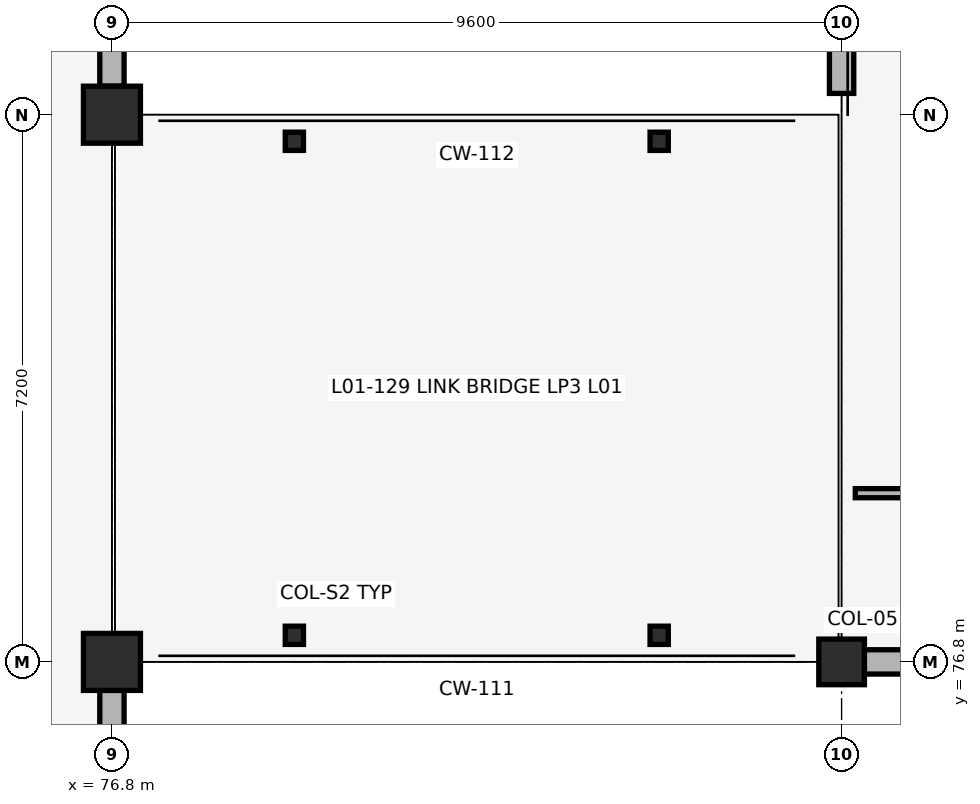
"""IFC4 building model, lengths in metres.
Left out: names, types, materials, properties, quantities, classifications, styles, units other than length and angle.
Written with IfcOpenShell. Run it as: python <this file> out.ifc"""

import sys

from ifc_helpers import new_model, si_unit, direction, frame, frame_2d, origin, origin_2d, place, context, subcontext, project, spatial, rectangle, i_section, extrude, element, save


model = new_model("IFC4")
c1 = context("Model", 3, precision=1e-05, world=origin(), true_north=direction((0.0, 1.0)))
c2 = subcontext(c1, "Body", "Model", "MODEL_VIEW")
j1 = project(units=[si_unit("LENGTHUNIT", "METRE"), si_unit("PLANEANGLEUNIT", "RADIAN")], contexts=[c1])
p1 = place(None, origin())
s1 = spatial("IfcSite", under=j1, at=p1, CompositionType="ELEMENT")
p2 = place(p1, origin())
s2 = spatial("IfcBuilding", under=s1, at=p2, CompositionType="ELEMENT")
p3 = place(p2, frame((0.0, 0.0, 4.42)))
s3 = spatial("IfcBuildingStorey", under=s2, at=p3, CompositionType="ELEMENT", Elevation=4.42)
for number, where, z_axis, x_axis in (
    (1, (76.8, 76.8, 0.0), (0.0, 0.0, 1.0), (1.0, 0.0, 0.0)),
    (2, (76.8, 84.0, 0.0), (0.0, 0.0, 1.0), (1.0, 0.0, 0.0)),
):
    element("IfcColumn", number, at=place(p3, frame(where, z_axis=z_axis, x_axis=x_axis)), inside=s3, PredefinedType="COLUMN", context=c2, shape_type="SweptSolid", body=[
        extrude(rectangle(XDim=0.75, YDim=0.75, at=origin_2d()), origin(), (0.0, 0.0, 1.0), 4.08),
    ])
for number, where, z_axis, x_axis in (
    (3, (79.2, 77.15, 0.0), (0.0, 0.0, 1.0), (1.0, 0.0, 0.0)),
    (4, (79.2, 83.65, 0.0), (0.0, 0.0, 1.0), (1.0, 0.0, 0.0)),
    (5, (84.0, 77.15, 0.0), (0.0, 0.0, 1.0), (1.0, 0.0, 0.0)),
    (6, (84.0, 83.65, 0.0), (0.0, 0.0, 1.0), (1.0, 0.0, 0.0)),
):
    element("IfcColumn", number, at=place(p3, frame(where, z_axis=z_axis, x_axis=x_axis)), inside=s3, PredefinedType="COLUMN", context=c2, shape_type="SweptSolid", body=[
        extrude(i_section(OverallWidth=0.24, OverallDepth=0.24, WebThickness=0.01, FlangeThickness=0.017, FilletRadius=0.021, at=origin_2d()), origin(), (0.0, 0.0, 1.0), 4.08),
    ])
p4 = place(p3, frame((86.4, 76.8, 0.0), z_axis=(0.0, 0.0, 1.0), x_axis=(1.0, 0.0, 0.0)))
e7 = element("IfcColumn", 7, at=p4, inside=s3, PredefinedType="COLUMN", context=c2, shape_type="SweptSolid", body=[
    extrude(rectangle(XDim=0.6, YDim=0.6, at=origin_2d()), origin(), (0.0, 0.0, 1.0), 4.28),
])
p5 = place(p3, frame((86.7, 76.8, 0.0), z_axis=(0.0, 0.0, 1.0), x_axis=(1.0, 0.0, 0.0)))
e8 = element("IfcWall", 8, at=p5, inside=s3, PredefinedType="SOLIDWALL", context=c2, shape_type="SweptSolid", body=[
    extrude(rectangle(XDim=9.0, YDim=0.32, at=frame_2d((4.5, 0.0))), origin(), (0.0, 0.0, 1.0), 3.63),
])
p6 = place(p5, frame((2.325, 0.0, 0.72)))
e9 = element("IfcOpeningElement", 9, at=p6, cuts=e8, PredefinedType="OPENING", context=c2, shape_type="SweptSolid", body=[
    extrude(rectangle(XDim=1.35, YDim=2.42, at=frame_2d((0.675, 1.21))), frame((0.0, 0.17, 0.0), z_axis=(0.0, -1.0, 0.0), x_axis=(1.0, 0.0, 0.0)), (0.0, 0.0, 1.0), 0.34),
])
p7 = place(p5, frame((5.325, 0.0, 0.72)))
e10 = element("IfcOpeningElement", 10, at=p7, cuts=e8, PredefinedType="OPENING", context=c2, shape_type="SweptSolid", body=[
    extrude(rectangle(XDim=1.35, YDim=2.42, at=frame_2d((0.675, 1.21))), frame((0.0, 0.17, 0.0), z_axis=(0.0, -1.0, 0.0), x_axis=(1.0, 0.0, 0.0)), (0.0, 0.0, 1.0), 0.34),
])
p8 = place(p3, frame((86.4, 90.92, 0.0), z_axis=(0.0, 0.0, 1.0), x_axis=(0.0, -1.0, 0.0)))
e11 = element("IfcWall", 11, at=p8, inside=s3, PredefinedType="SOLIDWALL", context=c2, shape_type="SweptSolid", body=[
    extrude(rectangle(XDim=6.64, YDim=0.32, at=frame_2d((3.32, 0.0))), origin(), (0.0, 0.0, 1.0), 3.63),
])
p9 = place(p8, frame((1.538, 0.0, 0.72)))
e12 = element("IfcOpeningElement", 12, at=p9, cuts=e11, PredefinedType="OPENING", context=c2, shape_type="SweptSolid", body=[
    extrude(rectangle(XDim=1.35, YDim=2.42, at=frame_2d((0.675, 1.21))), frame((0.0, 0.17, 0.0), z_axis=(0.0, -1.0, 0.0), x_axis=(1.0, 0.0, 0.0)), (0.0, 0.0, 1.0), 0.34),
])
p10 = place(p8, frame((3.752, 0.0, 0.72)))
e13 = element("IfcOpeningElement", 13, at=p10, cuts=e11, PredefinedType="OPENING", context=c2, shape_type="SweptSolid", body=[
    extrude(rectangle(XDim=1.35, YDim=2.42, at=frame_2d((0.675, 1.21))), frame((0.0, 0.17, 0.0), z_axis=(0.0, -1.0, 0.0), x_axis=(1.0, 0.0, 0.0)), (0.0, 0.0, 1.0), 0.34),
])
for number, where, z_axis, x_axis in (
    (14, (76.8, 69.975, 0.0), (0.0, 0.0, 1.0), (0.0, 1.0, 0.0)),
    (15, (76.8, 84.375, 0.0), (0.0, 0.0, 1.0), (0.0, 1.0, 0.0)),
):
    element("IfcWall", number, at=place(p3, frame(where, z_axis=z_axis, x_axis=x_axis)), inside=s3, PredefinedType="SOLIDWALL", context=c2, shape_type="SweptSolid", body=[
        extrude(rectangle(XDim=6.45, YDim=0.32, at=frame_2d((3.225, 0.0))), origin(), (0.0, 0.0, 1.0), 3.05),
    ])
p11 = place(p3, frame((86.58, 79.02, 0.0), z_axis=(0.0, 0.0, 1.0), x_axis=(1.0, 0.0, 0.0)))
e16 = element("IfcWall", 16, at=p11, inside=s3, PredefinedType="PARTITIONING", context=c2, shape_type="SweptSolid", body=[
    extrude(rectangle(XDim=31.24, YDim=0.12, at=frame_2d((15.62, 0.0))), origin(), (0.0, 0.0, 1.0), 3.12),
])
p12 = place(p11, frame((14.92, 0.0, 0.0)))
e17 = element("IfcOpeningElement", 17, at=p12, cuts=e16, PredefinedType="OPENING", context=c2, shape_type="SweptSolid", body=[
    extrude(rectangle(XDim=1.4, YDim=2.12, at=frame_2d((0.7, 1.06))), frame((0.0, 0.07, 0.0), z_axis=(0.0, -1.0, 0.0), x_axis=(1.0, 0.0, 0.0)), (0.0, 0.0, 1.0), 0.14),
])
save(model, sys.argv[1])
